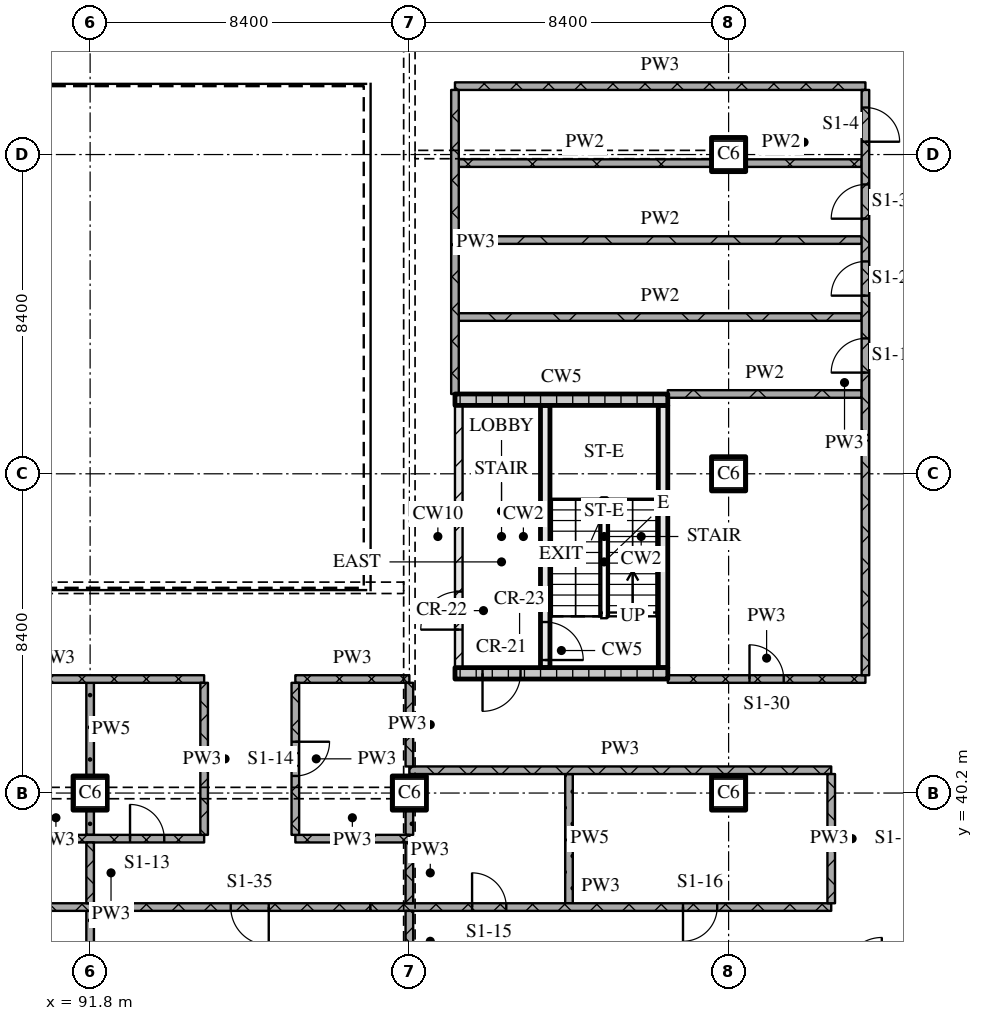
"""IFC4 building model, lengths in metres.
Left out: names, types, materials, properties, quantities, classifications, styles, units other than length and angle.
Written with IfcOpenShell. Run it as: python <this file> out.ifc"""

import sys

from ifc_helpers import new_model, si_unit, direction, frame, frame_2d, origin, origin_2d, place, context, subcontext, project, spatial, rectangle, extrude, element, fill, save


model = new_model("IFC4")
c1 = context("Model", 3, precision=1e-05, world=origin(), true_north=direction((0.0, 1.0)))
c2 = subcontext(c1, "Body", "Model", "MODEL_VIEW")
j1 = project(units=[si_unit("LENGTHUNIT", "METRE"), si_unit("PLANEANGLEUNIT", "RADIAN")], contexts=[c1])
p1 = place(None, origin())
s1 = spatial("IfcSite", under=j1, at=p1, CompositionType="ELEMENT")
p2 = place(p1, origin())
s2 = spatial("IfcBuilding", under=s1, at=p2, CompositionType="ELEMENT")
p3 = place(p2, frame((0.0, 0.0, 19.2)))
s3 = spatial("IfcBuildingStorey", under=s2, at=p3, CompositionType="ELEMENT", Elevation=19.2)
for number, where, z_axis, x_axis in (
    (1, (91.8, 40.2, 0.0), (0.0, 0.0, 1.0), (1.0, 0.0, 0.0)),
    (2, (100.2, 40.2, 0.0), (0.0, 0.0, 1.0), (1.0, 0.0, 0.0)),
    (3, (108.6, 40.2, 0.0), (0.0, 0.0, 1.0), (1.0, 0.0, 0.0)),
    (4, (108.6, 48.6, 0.0), (0.0, 0.0, 1.0), (1.0, 0.0, 0.0)),
    (5, (108.6, 57.0, 0.0), (0.0, 0.0, 1.0), (1.0, 0.0, 0.0)),
):
    element("IfcColumn", number, at=place(p3, frame(where, z_axis=z_axis, x_axis=x_axis)), inside=s3, PredefinedType="COLUMN", context=c2, shape_type="SweptSolid", body=[
        extrude(rectangle(XDim=0.9, YDim=0.9, at=origin_2d()), origin(), (0.0, 0.0, 1.0), 4.5),
    ])
p4 = place(p3, frame((101.4, 43.35, 0.0), z_axis=(0.0, 0.0, 1.0), x_axis=(1.0, 0.0, 0.0)))
e6 = element("IfcWall", 6, at=p4, inside=s3, PredefinedType="SOLIDWALL", context=c2, shape_type="SweptSolid", body=[
    extrude(rectangle(XDim=5.6, YDim=0.3, at=frame_2d((2.8, 0.0))), origin(), (0.0, 0.0, 1.0), 4.2),
])
p5 = place(p4, frame((0.725, 0.0, 0.0)))
e7 = element("IfcOpeningElement", 7, at=p5, cuts=e6, PredefinedType="OPENING", context=c2, shape_type="SweptSolid", body=[
    extrude(rectangle(XDim=1.0, YDim=2.1, at=frame_2d((0.5, 1.05))), frame((0.0, 0.16, 0.0), z_axis=(0.0, -1.0, 0.0), x_axis=(1.0, 0.0, 0.0)), (0.0, 0.0, 1.0), 0.32),
])
p6 = place(p3, frame((101.5, 43.5, 0.0), z_axis=(0.0, 0.0, 1.0), x_axis=(0.0, 1.0, 0.0)))
e8 = element("IfcWall", 8, at=p6, inside=s3, PredefinedType="PARTITIONING", context=c2, shape_type="SweptSolid", body=[
    extrude(rectangle(XDim=6.9, YDim=0.2, at=frame_2d((3.45, 0.0))), origin(), (0.0, 0.0, 1.0), 4.2),
])
p7 = place(p6, frame((1.0, 0.0, 0.0)))
e9 = element("IfcOpeningElement", 9, at=p7, cuts=e8, PredefinedType="OPENING", context=c2, shape_type="SweptSolid", body=[
    extrude(rectangle(XDim=1.0, YDim=2.1, at=frame_2d((0.5, 1.05))), frame((0.0, 0.11, 0.0), z_axis=(0.0, -1.0, 0.0), x_axis=(1.0, 0.0, 0.0)), (0.0, 0.0, 1.0), 0.22),
])
p8 = place(p3, frame((103.775, 43.5, 0.0), z_axis=(0.0, 0.0, 1.0), x_axis=(0.0, 1.0, 0.0)))
e10 = element("IfcWall", 10, at=p8, inside=s3, PredefinedType="SOLIDWALL", context=c2, shape_type="SweptSolid", body=[
    extrude(rectangle(XDim=6.9, YDim=0.25, at=frame_2d((3.45, 0.0))), origin(), (0.0, 0.0, 1.0), 4.2),
])
p9 = place(p8, frame((0.2, 0.0, 0.0)))
e11 = element("IfcOpeningElement", 11, at=p9, cuts=e10, PredefinedType="OPENING", context=c2, shape_type="SweptSolid", body=[
    extrude(rectangle(XDim=1.0, YDim=2.1, at=frame_2d((0.5, 1.05))), frame((0.0, 0.135, 0.0), z_axis=(0.0, -1.0, 0.0), x_axis=(1.0, 0.0, 0.0)), (0.0, 0.0, 1.0), 0.27),
])
p10 = place(p3, frame((106.875, 43.5, 0.0), z_axis=(0.0, 0.0, 1.0), x_axis=(0.0, 1.0, 0.0)))
e12 = element("IfcWall", 12, at=p10, inside=s3, PredefinedType="SOLIDWALL", context=c2, shape_type="SweptSolid", body=[
    extrude(rectangle(XDim=6.9, YDim=0.25, at=frame_2d((3.45, 0.0))), origin(), (0.0, 0.0, 1.0), 4.2),
])
p11 = place(p3, frame((101.4, 50.55, 0.0), z_axis=(0.0, 0.0, 1.0), x_axis=(1.0, 0.0, 0.0)))
e13 = element("IfcWall", 13, at=p11, inside=s3, PredefinedType="SOLIDWALL", context=c2, shape_type="SweptSolid", body=[
    extrude(rectangle(XDim=5.6, YDim=0.3, at=frame_2d((2.8, 0.0))), origin(), (0.0, 0.0, 1.0), 4.2),
])
p12 = place(p3, frame((99.175, 37.2, 0.0), z_axis=(0.0, 0.0, 1.0), x_axis=(-1.0, 0.0, 0.0)))
e14 = element("IfcWall", 14, at=p12, inside=s3, PredefinedType="PARTITIONING", context=c2, shape_type="SweptSolid", body=[
    extrude(rectangle(XDim=23.375, YDim=0.2, at=frame_2d((11.688, 0.0))), origin(), (0.0, 0.0, 1.0), 4.2),
])
p13 = place(p12, frame((2.675, 0.0, 0.0)))
e15 = element("IfcOpeningElement", 15, at=p13, cuts=e14, PredefinedType="OPENING", context=c2, shape_type="SweptSolid", body=[
    extrude(rectangle(XDim=1.0, YDim=2.1, at=frame_2d((0.5, 1.05))), frame((0.0, 0.11, 0.0), z_axis=(0.0, -1.0, 0.0), x_axis=(1.0, 0.0, 0.0)), (0.0, 0.0, 1.0), 0.22),
])
p14 = place(p12, frame((11.075, 0.0, 0.0)))
e16 = element("IfcOpeningElement", 16, at=p14, cuts=e14, PredefinedType="OPENING", context=c2, shape_type="SweptSolid", body=[
    extrude(rectangle(XDim=1.0, YDim=2.1, at=frame_2d((0.5, 1.05))), frame((0.0, 0.11, 0.0), z_axis=(0.0, -1.0, 0.0), x_axis=(1.0, 0.0, 0.0)), (0.0, 0.0, 1.0), 0.22),
])
p15 = place(p12, frame((19.475, 0.0, 0.0)))
e17 = element("IfcOpeningElement", 17, at=p15, cuts=e14, PredefinedType="OPENING", context=c2, shape_type="SweptSolid", body=[
    extrude(rectangle(XDim=1.0, YDim=2.1, at=frame_2d((0.5, 1.05))), frame((0.0, 0.11, 0.0), z_axis=(0.0, -1.0, 0.0), x_axis=(1.0, 0.0, 0.0)), (0.0, 0.0, 1.0), 0.22),
])
p16 = place(p3, frame((99.175, 37.2, 0.0), z_axis=(0.0, 0.0, 1.0), x_axis=(1.0, 0.0, 0.0)))
e18 = element("IfcWall", 18, at=p16, inside=s3, PredefinedType="PARTITIONING", context=c2, shape_type="SweptSolid", body=[
    extrude(rectangle(XDim=12.125, YDim=0.2, at=frame_2d((6.062, 0.0))), origin(), (0.0, 0.0, 1.0), 4.2),
])
p17 = place(p16, frame((2.675, 0.0, 0.0)))
e19 = element("IfcOpeningElement", 19, at=p17, cuts=e18, PredefinedType="OPENING", context=c2, shape_type="SweptSolid", body=[
    extrude(rectangle(XDim=0.9, YDim=2.1, at=frame_2d((0.45, 1.05))), frame((0.0, 0.11, 0.0), z_axis=(0.0, -1.0, 0.0), x_axis=(1.0, 0.0, 0.0)), (0.0, 0.0, 1.0), 0.22),
])
p18 = place(p16, frame((8.225, 0.0, 0.0)))
e20 = element("IfcOpeningElement", 20, at=p18, cuts=e18, PredefinedType="OPENING", context=c2, shape_type="SweptSolid", body=[
    extrude(rectangle(XDim=0.9, YDim=2.1, at=frame_2d((0.45, 1.05))), frame((0.0, 0.11, 0.0), z_axis=(0.0, -1.0, 0.0), x_axis=(1.0, 0.0, 0.0)), (0.0, 0.0, 1.0), 0.22),
])
p19 = place(p3, frame((87.0, 39.0, 0.0), z_axis=(0.0, 0.0, 1.0), x_axis=(1.0, 0.0, 0.0)))
e21 = element("IfcWall", 21, at=p19, inside=s3, PredefinedType="PARTITIONING", context=c2, shape_type="SweptSolid", body=[
    extrude(rectangle(XDim=7.8, YDim=0.2, at=frame_2d((3.9, 0.0))), origin(), (0.0, 0.0, 1.0), 4.2),
])
p20 = place(p19, frame((5.85, 0.0, 0.0)))
e22 = element("IfcOpeningElement", 22, at=p20, cuts=e21, PredefinedType="OPENING", context=c2, shape_type="SweptSolid", body=[
    extrude(rectangle(XDim=0.9, YDim=2.1, at=frame_2d((0.45, 1.05))), frame((0.0, 0.11, 0.0), z_axis=(0.0, -1.0, 0.0), x_axis=(1.0, 0.0, 0.0)), (0.0, 0.0, 1.0), 0.22),
])
p21 = place(p3, frame((97.2, 39.0, 0.0), z_axis=(0.0, 0.0, 1.0), x_axis=(1.0, 0.0, 0.0)))
e23 = element("IfcWall", 23, at=p21, inside=s3, PredefinedType="PARTITIONING", context=c2, shape_type="SweptSolid", body=[
    extrude(rectangle(XDim=3.0, YDim=0.2, at=frame_2d((1.5, 0.0))), origin(), (0.0, 0.0, 1.0), 4.2),
])
p22 = place(p3, frame((100.2, 40.8, 0.0), z_axis=(0.0, 0.0, 1.0), x_axis=(1.0, 0.0, 0.0)))
e24 = element("IfcWall", 24, at=p22, inside=s3, PredefinedType="PARTITIONING", context=c2, shape_type="SweptSolid", body=[
    extrude(rectangle(XDim=11.1, YDim=0.2, at=frame_2d((5.55, 0.0))), origin(), (0.0, 0.0, 1.0), 4.2),
])
p23 = place(p3, frame((87.0, 43.2, 0.0), z_axis=(0.0, 0.0, 1.0), x_axis=(1.0, 0.0, 0.0)))
e25 = element("IfcWall", 25, at=p23, inside=s3, PredefinedType="PARTITIONING", context=c2, shape_type="SweptSolid", body=[
    extrude(rectangle(XDim=7.8, YDim=0.2, at=frame_2d((3.9, 0.0))), origin(), (0.0, 0.0, 1.0), 4.2),
])
p24 = place(p3, frame((97.2, 43.2, 0.0), z_axis=(0.0, 0.0, 1.0), x_axis=(1.0, 0.0, 0.0)))
e26 = element("IfcWall", 26, at=p24, inside=s3, PredefinedType="PARTITIONING", context=c2, shape_type="SweptSolid", body=[
    extrude(rectangle(XDim=3.0, YDim=0.2, at=frame_2d((1.5, 0.0))), origin(), (0.0, 0.0, 1.0), 4.2),
])
p25 = place(p3, frame((107.0, 43.2, 0.0), z_axis=(0.0, 0.0, 1.0), x_axis=(1.0, 0.0, 0.0)))
e27 = element("IfcWall", 27, at=p25, inside=s3, PredefinedType="PARTITIONING", context=c2, shape_type="SweptSolid", body=[
    extrude(rectangle(XDim=5.2, YDim=0.2, at=frame_2d((2.6, 0.0))), origin(), (0.0, 0.0, 1.0), 4.2),
])
p26 = place(p25, frame((2.15, 0.0, 0.0)))
e28 = element("IfcOpeningElement", 28, at=p26, cuts=e27, PredefinedType="OPENING", context=c2, shape_type="SweptSolid", body=[
    extrude(rectangle(XDim=0.9, YDim=2.1, at=frame_2d((0.45, 1.05))), frame((0.0, 0.11, 0.0), z_axis=(0.0, -1.0, 0.0), x_axis=(1.0, 0.0, 0.0)), (0.0, 0.0, 1.0), 0.22),
])
p27 = place(p3, frame((107.0, 50.7, 0.0), z_axis=(0.0, 0.0, 1.0), x_axis=(1.0, 0.0, 0.0)))
e29 = element("IfcWall", 29, at=p27, inside=s3, PredefinedType="PARTITIONING", context=c2, shape_type="SweptSolid", body=[
    extrude(rectangle(XDim=5.1, YDim=0.2, at=frame_2d((2.55, 0.0))), origin(), (0.0, 0.0, 1.0), 4.2),
])
for number, where, z_axis, x_axis in (
    (30, (101.5, 52.725, 0.0), (0.0, 0.0, 1.0), (1.0, 0.0, 0.0)),
    (31, (101.5, 54.75, 0.0), (0.0, 0.0, 1.0), (1.0, 0.0, 0.0)),
):
    element("IfcWall", number, at=place(p3, frame(where, z_axis=z_axis, x_axis=x_axis)), inside=s3, PredefinedType="PARTITIONING", context=c2, shape_type="SweptSolid", body=[
        extrude(rectangle(XDim=10.6, YDim=0.2, at=frame_2d((5.3, 0.0))), origin(), (0.0, 0.0, 1.0), 4.2),
    ])
p28 = place(p3, frame((101.5, 56.775, 0.0), z_axis=(0.0, 0.0, 1.0), x_axis=(1.0, 0.0, 0.0)))
e32 = element("IfcWall", 32, at=p28, inside=s3, PredefinedType="PARTITIONING", context=c2, shape_type="SweptSolid", body=[
    extrude(rectangle(XDim=6.63, YDim=0.2, at=frame_2d((3.315, 0.0))), origin(), (0.0, 0.0, 1.0), 4.2),
])
p29 = place(p3, frame((109.07, 56.775, 0.0), z_axis=(0.0, 0.0, 1.0), x_axis=(1.0, 0.0, 0.0)))
e33 = element("IfcWall", 33, at=p29, inside=s3, PredefinedType="PARTITIONING", context=c2, shape_type="SweptSolid", body=[
    extrude(rectangle(XDim=3.03, YDim=0.2, at=frame_2d((1.515, 0.0))), origin(), (0.0, 0.0, 1.0), 4.2),
])
p30 = place(p3, frame((101.4, 58.8, 0.0), z_axis=(0.0, 0.0, 1.0), x_axis=(1.0, 0.0, 0.0)))
e34 = element("IfcWall", 34, at=p30, inside=s3, PredefinedType="PARTITIONING", context=c2, shape_type="SweptSolid", body=[
    extrude(rectangle(XDim=10.8, YDim=0.2, at=frame_2d((5.4, 0.0))), origin(), (0.0, 0.0, 1.0), 4.2),
])
p31 = place(p3, frame((91.8, 38.9, 0.0), z_axis=(0.0, 0.0, 1.0), x_axis=(0.0, -1.0, 0.0)))
e35 = element("IfcWall", 35, at=p31, inside=s3, PredefinedType="PARTITIONING", context=c2, shape_type="SweptSolid", body=[
    extrude(rectangle(XDim=1.6, YDim=0.2, at=frame_2d((0.8, 0.0))), origin(), (0.0, 0.0, 1.0), 4.2),
])
p32 = place(p3, frame((91.8, 37.1, 0.0), z_axis=(0.0, 0.0, 1.0), x_axis=(0.0, -1.0, 0.0)))
e36 = element("IfcWall", 36, at=p32, inside=s3, PredefinedType="PARTITIONING", context=c2, shape_type="SweptSolid", body=[
    extrude(rectangle(XDim=4.83, YDim=0.2, at=frame_2d((2.415, 0.0))), origin(), (0.0, 0.0, 1.0), 4.2),
])
p33 = place(p3, frame((91.8, 39.73, 0.0), z_axis=(0.0, 0.0, 1.0), x_axis=(0.0, -1.0, 0.0)))
e37 = element("IfcWall", 37, at=p33, inside=s3, PredefinedType="PARTITIONING", context=c2, shape_type="SweptSolid", body=[
    extrude(rectangle(XDim=0.63, YDim=0.2, at=frame_2d((0.315, 0.0))), origin(), (0.0, 0.0, 1.0), 4.2),
])
p34 = place(p3, frame((91.8, 43.1, 0.0), z_axis=(0.0, 0.0, 1.0), x_axis=(0.0, -1.0, 0.0)))
e38 = element("IfcWall", 38, at=p34, inside=s3, PredefinedType="PARTITIONING", context=c2, shape_type="SweptSolid", body=[
    extrude(rectangle(XDim=2.43, YDim=0.2, at=frame_2d((1.215, 0.0))), origin(), (0.0, 0.0, 1.0), 4.2),
])
p35 = place(p3, frame((94.8, 43.1, 0.0), z_axis=(0.0, 0.0, 1.0), x_axis=(0.0, -1.0, 0.0)))
e39 = element("IfcWall", 39, at=p35, inside=s3, PredefinedType="PARTITIONING", context=c2, shape_type="SweptSolid", body=[
    extrude(rectangle(XDim=4.0, YDim=0.2, at=frame_2d((2.0, 0.0))), origin(), (0.0, 0.0, 1.0), 4.2),
])
p36 = place(p3, frame((97.2, 43.1, 0.0), z_axis=(0.0, 0.0, 1.0), x_axis=(0.0, -1.0, 0.0)))
e40 = element("IfcWall", 40, at=p36, inside=s3, PredefinedType="PARTITIONING", context=c2, shape_type="SweptSolid", body=[
    extrude(rectangle(XDim=4.0, YDim=0.2, at=frame_2d((2.0, 0.0))), origin(), (0.0, 0.0, 1.0), 4.2),
])
p37 = place(p36, frame((1.55, 0.0, 0.0)))
e41 = element("IfcOpeningElement", 41, at=p37, cuts=e40, PredefinedType="OPENING", context=c2, shape_type="SweptSolid", body=[
    extrude(rectangle(XDim=0.9, YDim=2.1, at=frame_2d((0.45, 1.05))), frame((0.0, 0.11, 0.0), z_axis=(0.0, -1.0, 0.0), x_axis=(1.0, 0.0, 0.0)), (0.0, 0.0, 1.0), 0.22),
])
p38 = place(p3, frame((100.2, 43.1, 0.0), z_axis=(0.0, 0.0, 1.0), x_axis=(0.0, -1.0, 0.0)))
e42 = element("IfcWall", 42, at=p38, inside=s3, PredefinedType="PARTITIONING", context=c2, shape_type="SweptSolid", body=[
    extrude(rectangle(XDim=2.2, YDim=0.2, at=frame_2d((1.1, 0.0))), origin(), (0.0, 0.0, 1.0), 3.3),
])
p39 = place(p3, frame((100.2, 39.73, 0.0), z_axis=(0.0, 0.0, 1.0), x_axis=(0.0, -1.0, 0.0)))
e43 = element("IfcWall", 43, at=p39, inside=s3, PredefinedType="PARTITIONING", context=c2, shape_type="SweptSolid", body=[
    extrude(rectangle(XDim=0.63, YDim=0.2, at=frame_2d((0.315, 0.0))), origin(), (0.0, 0.0, 1.0), 3.7),
])
p40 = place(p3, frame((101.4, 58.7, 0.0), z_axis=(0.0, 0.0, 1.0), x_axis=(0.0, -1.0, 0.0)))
e44 = element("IfcWall", 44, at=p40, inside=s3, PredefinedType="PARTITIONING", context=c2, shape_type="SweptSolid", body=[
    extrude(rectangle(XDim=8.0, YDim=0.2, at=frame_2d((4.0, 0.0))), origin(), (0.0, 0.0, 1.0), 4.2),
])
for number, where, z_axis, x_axis in (
    (45, (104.4, 40.7, 0.0), (0.0, 0.0, 1.0), (0.0, -1.0, 0.0)),
    (46, (111.3, 40.7, 0.0), (0.0, 0.0, 1.0), (0.0, -1.0, 0.0)),
):
    element("IfcWall", number, at=place(p3, frame(where, z_axis=z_axis, x_axis=x_axis)), inside=s3, PredefinedType="PARTITIONING", context=c2, shape_type="SweptSolid", body=[
        extrude(rectangle(XDim=3.4, YDim=0.2, at=frame_2d((1.7, 0.0))), origin(), (0.0, 0.0, 1.0), 4.2),
    ])
p41 = place(p3, frame((112.2, 43.3, 0.0), z_axis=(0.0, 0.0, 1.0), x_axis=(0.0, 1.0, 0.0)))
e47 = element("IfcWall", 47, at=p41, inside=s3, PredefinedType="PARTITIONING", context=c2, shape_type="SweptSolid", body=[
    extrude(rectangle(XDim=15.4, YDim=0.2, at=frame_2d((7.7, 0.0))), origin(), (0.0, 0.0, 1.0), 4.2),
])
p42 = place(p41, frame((7.962, 0.0, 0.0)))
e48 = element("IfcOpeningElement", 48, at=p42, cuts=e47, PredefinedType="OPENING", context=c2, shape_type="SweptSolid", body=[
    extrude(rectangle(XDim=0.9, YDim=2.1, at=frame_2d((0.45, 1.05))), frame((0.0, 0.11, 0.0), z_axis=(0.0, -1.0, 0.0), x_axis=(1.0, 0.0, 0.0)), (0.0, 0.0, 1.0), 0.22),
])
p43 = place(p41, frame((9.988, 0.0, 0.0)))
e49 = element("IfcOpeningElement", 49, at=p43, cuts=e47, PredefinedType="OPENING", context=c2, shape_type="SweptSolid", body=[
    extrude(rectangle(XDim=0.9, YDim=2.1, at=frame_2d((0.45, 1.05))), frame((0.0, 0.11, 0.0), z_axis=(0.0, -1.0, 0.0), x_axis=(1.0, 0.0, 0.0)), (0.0, 0.0, 1.0), 0.22),
])
p44 = place(p41, frame((12.012, 0.0, 0.0)))
e50 = element("IfcOpeningElement", 50, at=p44, cuts=e47, PredefinedType="OPENING", context=c2, shape_type="SweptSolid", body=[
    extrude(rectangle(XDim=0.9, YDim=2.1, at=frame_2d((0.45, 1.05))), frame((0.0, 0.11, 0.0), z_axis=(0.0, -1.0, 0.0), x_axis=(1.0, 0.0, 0.0)), (0.0, 0.0, 1.0), 0.22),
])
p45 = place(p41, frame((14.038, 0.0, 0.0)))
e51 = element("IfcOpeningElement", 51, at=p45, cuts=e47, PredefinedType="OPENING", context=c2, shape_type="SweptSolid", body=[
    extrude(rectangle(XDim=0.9, YDim=2.1, at=frame_2d((0.45, 1.05))), frame((0.0, 0.11, 0.0), z_axis=(0.0, -1.0, 0.0), x_axis=(1.0, 0.0, 0.0)), (0.0, 0.0, 1.0), 0.22),
])
p46 = place(p3, frame((100.2, 37.1, 0.0), z_axis=(0.0, 0.0, 1.0), x_axis=(0.0, -1.0, 0.0)))
e52 = element("IfcWall", 52, at=p46, inside=s3, PredefinedType="PARTITIONING", context=c2, shape_type="SweptSolid", body=[
    extrude(rectangle(XDim=1.6, YDim=0.2, at=frame_2d((0.8, 0.0))), origin(), (0.0, 0.0, 1.0), 3.7),
])
p47 = place(p3, frame((100.2, 38.9, 0.0), z_axis=(0.0, 0.0, 1.0), x_axis=(0.0, -1.0, 0.0)))
e53 = element("IfcWall", 53, at=p47, inside=s3, PredefinedType="PARTITIONING", context=c2, shape_type="SweptSolid", body=[
    extrude(rectangle(XDim=1.6, YDim=0.2, at=frame_2d((0.8, 0.0))), origin(), (0.0, 0.0, 1.0), 3.7),
])
p48 = place(p5, origin())
e54 = element("IfcDoor", 54, at=p48, inside=s3, OperationType="SINGLE_SWING_RIGHT", PredefinedType="DOOR", context=c2, shape_type="SweptSolid", body=[
    extrude(rectangle(XDim=1.0, YDim=2.1, at=frame_2d((0.5, 1.05))), frame((0.0, 0.025, 0.0), z_axis=(0.0, -1.0, 0.0), x_axis=(1.0, 0.0, 0.0)), (0.0, 0.0, 1.0), 0.05),
])
fill(e7, e54)
p49 = place(p9, origin())
e55 = element("IfcDoor", 55, at=p49, inside=s3, OperationType="SINGLE_SWING_RIGHT", PredefinedType="DOOR", context=c2, shape_type="SweptSolid", body=[
    extrude(rectangle(XDim=1.0, YDim=2.1, at=frame_2d((0.5, 1.05))), frame((0.0, 0.025, 0.0), z_axis=(0.0, -1.0, 0.0), x_axis=(1.0, 0.0, 0.0)), (0.0, 0.0, 1.0), 0.05),
])
fill(e11, e55)
p50 = place(p7, origin())
e56 = element("IfcDoor", 56, at=p50, inside=s3, OperationType="SINGLE_SWING_LEFT", PredefinedType="DOOR", context=c2, shape_type="SweptSolid", body=[
    extrude(rectangle(XDim=1.0, YDim=2.1, at=frame_2d((0.5, 1.05))), frame((0.0, 0.025, 0.0), z_axis=(0.0, -1.0, 0.0), x_axis=(1.0, 0.0, 0.0)), (0.0, 0.0, 1.0), 0.05),
])
fill(e9, e56)
p51 = place(p13, origin())
e57 = element("IfcDoor", 57, at=p51, inside=s3, OperationType="SINGLE_SWING_LEFT", PredefinedType="DOOR", context=c2, shape_type="SweptSolid", body=[
    extrude(rectangle(XDim=1.0, YDim=2.1, at=frame_2d((0.5, 1.05))), frame((0.0, 0.025, 0.0), z_axis=(0.0, -1.0, 0.0), x_axis=(1.0, 0.0, 0.0)), (0.0, 0.0, 1.0), 0.05),
])
fill(e15, e57)
p52 = place(p17, origin())
e58 = element("IfcDoor", 58, at=p52, inside=s3, OperationType="SINGLE_SWING_LEFT", PredefinedType="DOOR", context=c2, shape_type="SweptSolid", body=[
    extrude(rectangle(XDim=0.9, YDim=2.1, at=frame_2d((0.45, 1.05))), frame((0.0, 0.025, 0.0), z_axis=(0.0, -1.0, 0.0), x_axis=(1.0, 0.0, 0.0)), (0.0, 0.0, 1.0), 0.05),
])
fill(e19, e58)
p53 = place(p18, origin())
e59 = element("IfcDoor", 59, at=p53, inside=s3, OperationType="SINGLE_SWING_RIGHT", PredefinedType="DOOR", context=c2, shape_type="SweptSolid", body=[
    extrude(rectangle(XDim=0.9, YDim=2.1, at=frame_2d((0.45, 1.05))), frame((0.0, 0.025, 0.0), z_axis=(0.0, -1.0, 0.0), x_axis=(1.0, 0.0, 0.0)), (0.0, 0.0, 1.0), 0.05),
])
fill(e20, e59)
p54 = place(p20, origin())
e60 = element("IfcDoor", 60, at=p54, inside=s3, OperationType="SINGLE_SWING_LEFT", PredefinedType="DOOR", context=c2, shape_type="SweptSolid", body=[
    extrude(rectangle(XDim=0.9, YDim=2.1, at=frame_2d((0.45, 1.05))), frame((0.0, 0.025, 0.0), z_axis=(0.0, -1.0, 0.0), x_axis=(1.0, 0.0, 0.0)), (0.0, 0.0, 1.0), 0.05),
])
fill(e22, e60)
p55 = place(p26, origin())
e61 = element("IfcDoor", 61, at=p55, inside=s3, OperationType="SINGLE_SWING_LEFT", PredefinedType="DOOR", context=c2, shape_type="SweptSolid", body=[
    extrude(rectangle(XDim=0.9, YDim=2.1, at=frame_2d((0.45, 1.05))), frame((0.0, 0.025, 0.0), z_axis=(0.0, -1.0, 0.0), x_axis=(1.0, 0.0, 0.0)), (0.0, 0.0, 1.0), 0.05),
])
fill(e28, e61)
p56 = place(p37, origin())
e62 = element("IfcDoor", 62, at=p56, inside=s3, OperationType="SINGLE_SWING_LEFT", PredefinedType="DOOR", context=c2, shape_type="SweptSolid", body=[
    extrude(rectangle(XDim=0.9, YDim=2.1, at=frame_2d((0.45, 1.05))), frame((0.0, 0.025, 0.0), z_axis=(0.0, -1.0, 0.0), x_axis=(1.0, 0.0, 0.0)), (0.0, 0.0, 1.0), 0.05),
])
fill(e41, e62)
p57 = place(p42, origin())
e63 = element("IfcDoor", 63, at=p57, inside=s3, OperationType="SINGLE_SWING_LEFT", PredefinedType="DOOR", context=c2, shape_type="SweptSolid", body=[
    extrude(rectangle(XDim=0.9, YDim=2.1, at=frame_2d((0.45, 1.05))), frame((0.0, 0.025, 0.0), z_axis=(0.0, -1.0, 0.0), x_axis=(1.0, 0.0, 0.0)), (0.0, 0.0, 1.0), 0.05),
])
fill(e48, e63)
p58 = place(p43, origin())
e64 = element("IfcDoor", 64, at=p58, inside=s3, OperationType="SINGLE_SWING_LEFT", PredefinedType="DOOR", context=c2, shape_type="SweptSolid", body=[
    extrude(rectangle(XDim=0.9, YDim=2.1, at=frame_2d((0.45, 1.05))), frame((0.0, 0.025, 0.0), z_axis=(0.0, -1.0, 0.0), x_axis=(1.0, 0.0, 0.0)), (0.0, 0.0, 1.0), 0.05),
])
fill(e49, e64)
p59 = place(p44, origin())
e65 = element("IfcDoor", 65, at=p59, inside=s3, OperationType="SINGLE_SWING_LEFT", PredefinedType="DOOR", context=c2, shape_type="SweptSolid", body=[
    extrude(rectangle(XDim=0.9, YDim=2.1, at=frame_2d((0.45, 1.05))), frame((0.0, 0.025, 0.0), z_axis=(0.0, -1.0, 0.0), x_axis=(1.0, 0.0, 0.0)), (0.0, 0.0, 1.0), 0.05),
])
fill(e50, e65)
p60 = place(p45, origin())
e66 = element("IfcDoor", 66, at=p60, inside=s3, OperationType="SINGLE_SWING_RIGHT", PredefinedType="DOOR", context=c2, shape_type="SweptSolid", body=[
    extrude(rectangle(XDim=0.9, YDim=2.1, at=frame_2d((0.45, 1.05))), frame((0.0, 0.025, 0.0), z_axis=(0.0, -1.0, 0.0), x_axis=(1.0, 0.0, 0.0)), (0.0, 0.0, 1.0), 0.05),
])
fill(e51, e66)
save(model, sys.argv[1])
